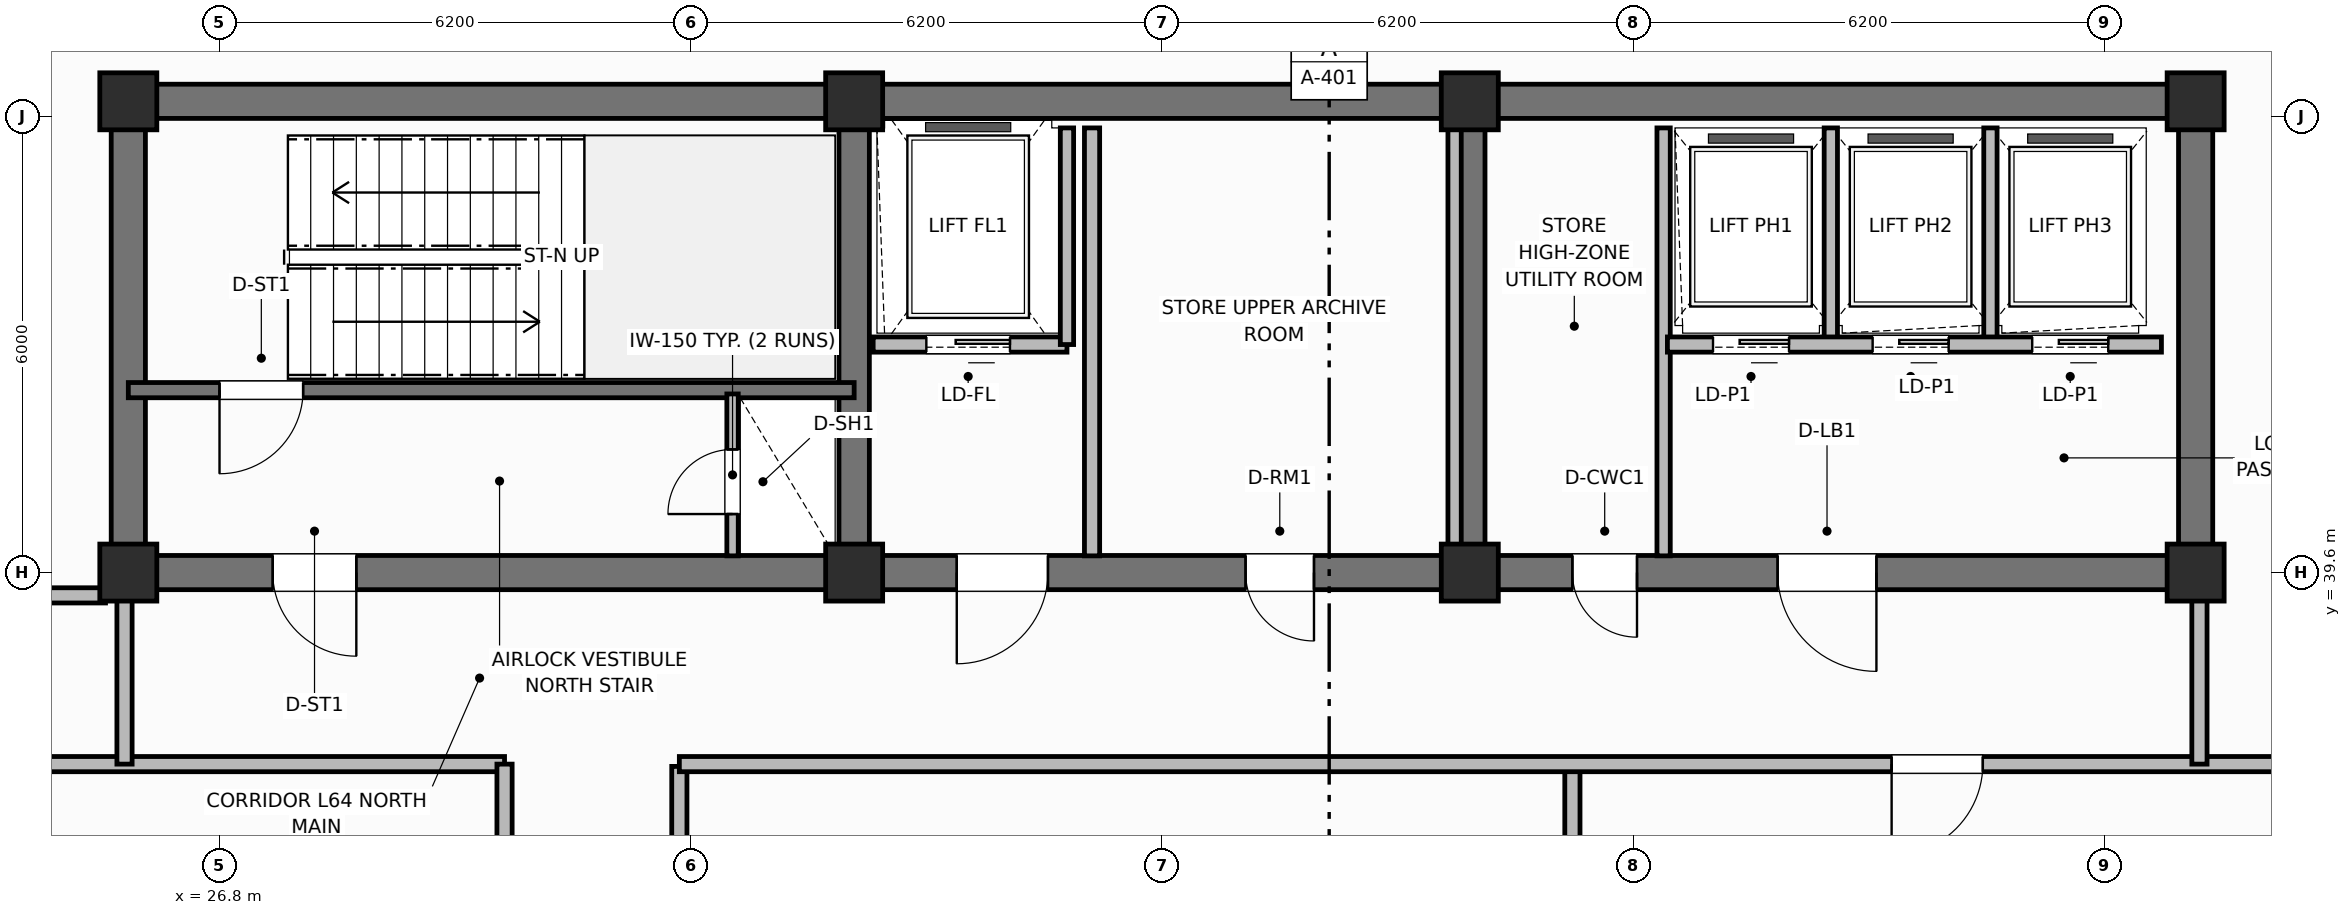
"""IFC4 building model, lengths in metres.
Left out: names, types, materials, properties, quantities, classifications, styles, units other than length and angle.
Written with IfcOpenShell. Run it as: python <this file> out.ifc"""

import sys

from ifc_helpers import new_model, si_unit, direction, frame, frame_2d, origin, origin_2d, place, context, subcontext, project, spatial, rectangle, extrude, element, fill, save


model = new_model("IFC4")
c1 = context("Model", 3, precision=1e-05, world=origin(), true_north=direction((0.0, 1.0)))
c2 = subcontext(c1, "Body", "Model", "MODEL_VIEW")
j1 = project(units=[si_unit("LENGTHUNIT", "METRE"), si_unit("PLANEANGLEUNIT", "RADIAN")], contexts=[c1])
p1 = place(None, origin())
s1 = spatial("IfcSite", under=j1, at=p1, CompositionType="ELEMENT")
p2 = place(p1, origin())
s2 = spatial("IfcBuilding", under=s1, at=p2, CompositionType="ELEMENT")
p3 = place(p2, frame((0.0, 0.0, 255.4)))
s3 = spatial("IfcBuildingStorey", under=s2, at=p3, CompositionType="ELEMENT", Elevation=255.4)
p4 = place(p3, frame((25.6, 45.8, 0.0), z_axis=(0.0, 0.0, 1.0), x_axis=(1.0, 0.0, 0.0)))
e1 = element("IfcWall", 1, at=p4, inside=s3, PredefinedType="SHEAR", context=c2, shape_type="SweptSolid", body=[
    extrude(rectangle(XDim=27.2, YDim=0.45, at=frame_2d((13.6, 0.0))), origin(), (0.0, 0.0, 1.0), 4.8),
])
for number, where, z_axis, x_axis in (
    (2, (25.6, 39.825, 0.0), (0.0, 0.0, 1.0), (0.0, 1.0, 0.0)),
    (3, (52.8, 39.825, 0.0), (0.0, 0.0, 1.0), (0.0, 1.0, 0.0)),
):
    element("IfcWall", number, at=place(p3, frame(where, z_axis=z_axis, x_axis=x_axis)), inside=s3, PredefinedType="SHEAR", context=c2, shape_type="SweptSolid", body=[
        extrude(rectangle(XDim=5.75, YDim=0.45, at=frame_2d((2.875, 0.0))), origin(), (0.0, 0.0, 1.0), 4.8),
    ])
p5 = place(p3, frame((52.8, 39.6, 0.0), z_axis=(0.0, 0.0, 1.0), x_axis=(-1.0, 0.0, 0.0)))
e4 = element("IfcWall", 4, at=p5, inside=s3, PredefinedType="SHEAR", context=c2, shape_type="SweptSolid", body=[
    extrude(rectangle(XDim=27.2, YDim=0.45, at=frame_2d((13.6, 0.0))), origin(), (0.0, 0.0, 1.0), 4.8),
])
p6 = place(p5, frame((24.2, 0.0, 0.0)))
e5 = element("IfcOpeningElement", 5, at=p6, cuts=e4, PredefinedType="OPENING", context=c2, shape_type="SweptSolid", body=[
    extrude(rectangle(XDim=1.1, YDim=2.15, at=frame_2d((0.55, 1.075))), frame((0.0, 0.235, 0.0), z_axis=(0.0, -1.0, 0.0), x_axis=(1.0, 0.0, 0.0)), (0.0, 0.0, 1.0), 0.47),
])
p7 = place(p5, frame((15.1, 0.0, 0.0)))
e6 = element("IfcOpeningElement", 6, at=p7, cuts=e4, PredefinedType="OPENING", context=c2, shape_type="SweptSolid", body=[
    extrude(rectangle(XDim=1.2, YDim=2.15, at=frame_2d((0.6, 1.075))), frame((0.0, 0.235, 0.0), z_axis=(0.0, -1.0, 0.0), x_axis=(1.0, 0.0, 0.0)), (0.0, 0.0, 1.0), 0.47),
])
p8 = place(p5, frame((11.6, 0.0, 0.0)))
e7 = element("IfcOpeningElement", 7, at=p8, cuts=e4, PredefinedType="OPENING", context=c2, shape_type="SweptSolid", body=[
    extrude(rectangle(XDim=0.9, YDim=2.1, at=frame_2d((0.45, 1.05))), frame((0.0, 0.235, 0.0), z_axis=(0.0, -1.0, 0.0), x_axis=(1.0, 0.0, 0.0)), (0.0, 0.0, 1.0), 0.47),
])
p9 = place(p5, frame((7.35, 0.0, 0.0)))
e8 = element("IfcOpeningElement", 8, at=p9, cuts=e4, PredefinedType="OPENING", context=c2, shape_type="SweptSolid", body=[
    extrude(rectangle(XDim=0.85, YDim=2.1, at=frame_2d((0.425, 1.05))), frame((0.0, 0.235, 0.0), z_axis=(0.0, -1.0, 0.0), x_axis=(1.0, 0.0, 0.0)), (0.0, 0.0, 1.0), 0.47),
])
p10 = place(p5, frame((4.2, 0.0, 0.0)))
e9 = element("IfcOpeningElement", 9, at=p10, cuts=e4, PredefinedType="OPENING", context=c2, shape_type="SweptSolid", body=[
    extrude(rectangle(XDim=1.3, YDim=2.2, at=frame_2d((0.65, 1.1))), frame((0.0, 0.235, 0.0), z_axis=(0.0, -1.0, 0.0), x_axis=(1.0, 0.0, 0.0)), (0.0, 0.0, 1.0), 0.47),
])
for number, where, z_axis, x_axis in (
    (10, (35.15, 39.825, 0.0), (0.0, 0.0, 1.0), (0.0, 1.0, 0.0)),
    (11, (43.25, 39.825, 0.0), (0.0, 0.0, 1.0), (0.0, 1.0, 0.0)),
):
    element("IfcWall", number, at=place(p3, frame(where, z_axis=z_axis, x_axis=x_axis)), inside=s3, PredefinedType="SHEAR", context=c2, shape_type="SweptSolid", body=[
        extrude(rectangle(XDim=5.75, YDim=0.4, at=frame_2d((2.875, 0.0))), origin(), (0.0, 0.0, 1.0), 4.8),
    ])
for number, where, z_axis, x_axis in (
    (12, (25.6, 39.6, 0.0), (0.0, 0.0, 1.0), (1.0, 0.0, 0.0)),
    (13, (25.6, 45.8, 0.0), (0.0, 0.0, 1.0), (1.0, 0.0, 0.0)),
    (14, (35.15, 39.6, 0.0), (0.0, 0.0, 1.0), (1.0, 0.0, 0.0)),
    (15, (35.15, 45.8, 0.0), (0.0, 0.0, 1.0), (1.0, 0.0, 0.0)),
    (16, (43.25, 39.6, 0.0), (0.0, 0.0, 1.0), (1.0, 0.0, 0.0)),
    (17, (43.25, 45.8, 0.0), (0.0, 0.0, 1.0), (1.0, 0.0, 0.0)),
    (18, (52.8, 39.6, 0.0), (0.0, 0.0, 1.0), (1.0, 0.0, 0.0)),
    (19, (52.8, 45.8, 0.0), (0.0, 0.0, 1.0), (1.0, 0.0, 0.0)),
):
    element("IfcColumn", number, at=place(p3, frame(where, z_axis=z_axis, x_axis=x_axis)), inside=s3, PredefinedType="COLUMN", context=c2, shape_type="SweptSolid", body=[
        extrude(rectangle(XDim=0.75, YDim=0.75, at=origin_2d()), origin(), (0.0, 0.0, 1.0), 4.8),
    ])
p11 = place(p3, frame((35.15, 42.0, 0.0), z_axis=(0.0, 0.0, 1.0), x_axis=(-1.0, 0.0, 0.0)))
e20 = element("IfcWall", 20, at=p11, inside=s3, PredefinedType="SHEAR", context=c2, shape_type="SweptSolid", body=[
    extrude(rectangle(XDim=9.55, YDim=0.2, at=frame_2d((4.775, 0.0))), origin(), (0.0, 0.0, 1.0), 4.8),
])
p12 = place(p11, frame((7.25, 0.0, 0.0)))
e21 = element("IfcOpeningElement", 21, at=p12, cuts=e20, PredefinedType="OPENING", context=c2, shape_type="SweptSolid", body=[
    extrude(rectangle(XDim=1.1, YDim=2.15, at=frame_2d((0.55, 1.075))), frame((0.0, 0.11, 0.0), z_axis=(0.0, -1.0, 0.0), x_axis=(1.0, 0.0, 0.0)), (0.0, 0.0, 1.0), 0.22),
])
p13 = place(p3, frame((33.55, 39.82, 0.0), z_axis=(0.0, 0.0, 1.0), x_axis=(0.0, 1.0, 0.0)))
e22 = element("IfcWall", 22, at=p13, inside=s3, PredefinedType="PARTITIONING", context=c2, shape_type="SweptSolid", body=[
    extrude(rectangle(XDim=2.13, YDim=0.15, at=frame_2d((1.065, 0.0))), origin(), (0.0, 0.0, 1.0), 3.66),
])
p14 = place(p13, frame((0.55, 0.0, 0.0)))
e23 = element("IfcOpeningElement", 23, at=p14, cuts=e22, PredefinedType="OPENING", context=c2, shape_type="SweptSolid", body=[
    extrude(rectangle(XDim=0.85, YDim=2.05, at=frame_2d((0.425, 1.025))), frame((0.0, 0.085, 0.0), z_axis=(0.0, -1.0, 0.0), x_axis=(1.0, 0.0, 0.0)), (0.0, 0.0, 1.0), 0.17),
])
p15 = place(p3, frame((37.95, 42.6, 0.0), z_axis=(0.0, 0.0, 1.0), x_axis=(-1.0, 0.0, 0.0)))
e24 = element("IfcWall", 24, at=p15, inside=s3, PredefinedType="PARTITIONING", context=c2, shape_type="SweptSolid", body=[
    extrude(rectangle(XDim=2.55, YDim=0.2, at=frame_2d((1.275, 0.0))), origin(), (0.0, 0.0, 1.0), 3.43),
])
p16 = place(p15, frame((0.75, 0.0, 0.0)))
e25 = element("IfcOpeningElement", 25, at=p16, cuts=e24, PredefinedType="OPENING", context=c2, shape_type="SweptSolid", body=[
    extrude(rectangle(XDim=1.1, YDim=2.15, at=frame_2d((0.55, 1.075))), frame((0.0, 0.11, 0.0), z_axis=(0.0, -1.0, 0.0), x_axis=(1.0, 0.0, 0.0)), (0.0, 0.0, 1.0), 0.22),
])
p17 = place(p3, frame((37.95, 42.6, 0.0), z_axis=(0.0, 0.0, 1.0), x_axis=(0.0, 1.0, 0.0)))
e26 = element("IfcWall", 26, at=p17, inside=s3, PredefinedType="PARTITIONING", context=c2, shape_type="SweptSolid", body=[
    extrude(rectangle(XDim=2.85, YDim=0.175, at=frame_2d((1.425, 0.0))), origin(), (0.0, 0.0, 1.0), 3.66),
])
p18 = place(p3, frame((38.28, 39.82, 0.0), z_axis=(0.0, 0.0, 1.0), x_axis=(0.0, 1.0, 0.0)))
e27 = element("IfcWall", 27, at=p18, inside=s3, PredefinedType="PARTITIONING", context=c2, shape_type="SweptSolid", body=[
    extrude(rectangle(XDim=5.63, YDim=0.2, at=frame_2d((2.815, 0.0))), origin(), (0.0, 0.0, 1.0), 3.66),
])
for number, where, z_axis, x_axis in (
    (28, (43.05, 39.82, 0.0), (0.0, 0.0, 1.0), (0.0, 1.0, 0.0)),
    (29, (45.8, 39.82, 0.0), (0.0, 0.0, 1.0), (0.0, 1.0, 0.0)),
):
    element("IfcWall", number, at=place(p3, frame(where, z_axis=z_axis, x_axis=x_axis)), inside=s3, PredefinedType="PARTITIONING", context=c2, shape_type="SweptSolid", body=[
        extrude(rectangle(XDim=5.63, YDim=0.175, at=frame_2d((2.815, 0.0))), origin(), (0.0, 0.0, 1.0), 3.66),
    ])
for number, where, z_axis, x_axis in (
    (30, (48.0, 42.65, 0.0), (0.0, 0.0, 1.0), (0.0, 1.0, 0.0)),
    (31, (50.1, 42.65, 0.0), (0.0, 0.0, 1.0), (0.0, 1.0, 0.0)),
):
    element("IfcWall", number, at=place(p3, frame(where, z_axis=z_axis, x_axis=x_axis)), inside=s3, PredefinedType="PARTITIONING", context=c2, shape_type="SweptSolid", body=[
        extrude(rectangle(XDim=2.8, YDim=0.175, at=frame_2d((1.4, 0.0))), origin(), (0.0, 0.0, 1.0), 3.66),
    ])
p19 = place(p3, frame((52.35, 42.6, 0.0), z_axis=(0.0, 0.0, 1.0), x_axis=(-1.0, 0.0, 0.0)))
e32 = element("IfcWall", 32, at=p19, inside=s3, PredefinedType="PARTITIONING", context=c2, shape_type="SweptSolid", body=[
    extrude(rectangle(XDim=6.5, YDim=0.2, at=frame_2d((3.25, 0.0))), origin(), (0.0, 0.0, 1.0), 3.66),
])
p20 = place(p19, frame((4.9, 0.0, 0.0)))
e33 = element("IfcOpeningElement", 33, at=p20, cuts=e32, PredefinedType="OPENING", context=c2, shape_type="SweptSolid", body=[
    extrude(rectangle(XDim=1.0, YDim=2.15, at=frame_2d((0.5, 1.075))), frame((0.0, 0.11, 0.0), z_axis=(0.0, -1.0, 0.0), x_axis=(1.0, 0.0, 0.0)), (0.0, 0.0, 1.0), 0.22),
])
p21 = place(p19, frame((2.8, 0.0, 0.0)))
e34 = element("IfcOpeningElement", 34, at=p21, cuts=e32, PredefinedType="OPENING", context=c2, shape_type="SweptSolid", body=[
    extrude(rectangle(XDim=1.0, YDim=2.15, at=frame_2d((0.5, 1.075))), frame((0.0, 0.11, 0.0), z_axis=(0.0, -1.0, 0.0), x_axis=(1.0, 0.0, 0.0)), (0.0, 0.0, 1.0), 0.22),
])
p22 = place(p19, frame((0.7, 0.0, 0.0)))
e35 = element("IfcOpeningElement", 35, at=p22, cuts=e32, PredefinedType="OPENING", context=c2, shape_type="SweptSolid", body=[
    extrude(rectangle(XDim=1.0, YDim=2.15, at=frame_2d((0.5, 1.075))), frame((0.0, 0.11, 0.0), z_axis=(0.0, -1.0, 0.0), x_axis=(1.0, 0.0, 0.0)), (0.0, 0.0, 1.0), 0.22),
])
p23 = place(p3, frame((19.53, 37.08, 0.0), z_axis=(0.0, 0.0, 1.0), x_axis=(1.0, 0.0, 0.0)))
e36 = element("IfcWall", 36, at=p23, inside=s3, PredefinedType="PARTITIONING", context=c2, shape_type="SweptSolid", body=[
    extrude(rectangle(XDim=11.02, YDim=0.2, at=frame_2d((5.51, 0.0))), origin(), (0.0, 0.0, 1.0), 3.66),
])
p24 = place(p3, frame((30.55, 19.32, 0.0), z_axis=(0.0, 0.0, 1.0), x_axis=(0.0, 1.0, 0.0)))
e37 = element("IfcWall", 37, at=p24, inside=s3, PredefinedType="PARTITIONING", context=c2, shape_type="SweptSolid", body=[
    extrude(rectangle(XDim=17.76, YDim=0.2, at=frame_2d((8.88, 0.0))), origin(), (0.0, 0.0, 1.0), 3.66),
])
p25 = place(p24, frame((6.0, 0.0, 0.0)))
e38 = element("IfcOpeningElement", 38, at=p25, cuts=e37, PredefinedType="OPENING", context=c2, shape_type="SweptSolid", body=[
    extrude(rectangle(XDim=1.2, YDim=2.15, at=frame_2d((0.6, 1.075))), frame((0.0, 0.11, 0.0), z_axis=(0.0, -1.0, 0.0), x_axis=(1.0, 0.0, 0.0)), (0.0, 0.0, 1.0), 0.22),
])
p26 = place(p3, frame((32.85, 19.35, 0.0), z_axis=(0.0, 0.0, 1.0), x_axis=(0.0, 1.0, 0.0)))
e39 = element("IfcWall", 39, at=p26, inside=s3, PredefinedType="PARTITIONING", context=c2, shape_type="SweptSolid", body=[
    extrude(rectangle(XDim=17.7, YDim=0.2, at=frame_2d((8.85, 0.0))), origin(), (0.0, 0.0, 1.0), 3.66),
])
p27 = place(p26, frame((6.0, 0.0, 0.0)))
e40 = element("IfcOpeningElement", 40, at=p27, cuts=e39, PredefinedType="OPENING", context=c2, shape_type="SweptSolid", body=[
    extrude(rectangle(XDim=1.2, YDim=2.15, at=frame_2d((0.6, 1.075))), frame((0.0, 0.11, 0.0), z_axis=(0.0, -1.0, 0.0), x_axis=(1.0, 0.0, 0.0)), (0.0, 0.0, 1.0), 0.22),
])
p28 = place(p3, frame((44.6, 19.35, 0.0), z_axis=(0.0, 0.0, 1.0), x_axis=(0.0, 1.0, 0.0)))
e41 = element("IfcWall", 41, at=p28, inside=s3, PredefinedType="PARTITIONING", context=c2, shape_type="SweptSolid", body=[
    extrude(rectangle(XDim=17.7, YDim=0.2, at=frame_2d((8.85, 0.0))), origin(), (0.0, 0.0, 1.0), 3.66),
])
p29 = place(p3, frame((58.87, 37.08, 0.0), z_axis=(0.0, 0.0, 1.0), x_axis=(-1.0, 0.0, 0.0)))
e42 = element("IfcWall", 42, at=p29, inside=s3, PredefinedType="PARTITIONING", context=c2, shape_type="SweptSolid", body=[
    extrude(rectangle(XDim=26.02, YDim=0.2, at=frame_2d((13.01, 0.0))), origin(), (0.0, 0.0, 1.0), 3.66),
])
p30 = place(p29, frame((8.87, 0.0, 0.0)))
e43 = element("IfcOpeningElement", 43, at=p30, cuts=e42, PredefinedType="OPENING", context=c2, shape_type="SweptSolid", body=[
    extrude(rectangle(XDim=1.2, YDim=2.15, at=frame_2d((0.6, 1.075))), frame((0.0, 0.11, 0.0), z_axis=(0.0, -1.0, 0.0), x_axis=(1.0, 0.0, 0.0)), (0.0, 0.0, 1.0), 0.22),
])
for number, where, z_axis, x_axis in (
    (44, (52.85, 37.08, 0.0), (0.0, 0.0, 1.0), (0.0, 1.0, 0.0)),
    (45, (25.55, 37.08, 0.0), (0.0, 0.0, 1.0), (0.0, 1.0, 0.0)),
):
    element("IfcWall", number, at=place(p3, frame(where, z_axis=z_axis, x_axis=x_axis)), inside=s3, PredefinedType="PARTITIONING", context=c2, shape_type="SweptSolid", body=[
        extrude(rectangle(XDim=2.37, YDim=0.2, at=frame_2d((1.185, 0.0))), origin(), (0.0, 0.0, 1.0), 3.66),
    ])
p31 = place(p3, frame((19.53, 39.3, 0.0), z_axis=(0.0, 0.0, 1.0), x_axis=(1.0, 0.0, 0.0)))
e46 = element("IfcWall", 46, at=p31, inside=s3, PredefinedType="PARTITIONING", context=c2, shape_type="SweptSolid", body=[
    extrude(rectangle(XDim=5.77, YDim=0.2, at=frame_2d((2.885, 0.0))), origin(), (0.0, 0.0, 1.0), 3.66),
])
p32 = place(p12, origin())
e47 = element("IfcDoor", 47, at=p32, inside=s3, OperationType="SINGLE_SWING_RIGHT", PredefinedType="DOOR", context=c2, shape_type="SweptSolid", body=[
    extrude(rectangle(XDim=1.1, YDim=2.15, at=frame_2d((0.55, 1.075))), frame((0.0, 0.025, 0.0), z_axis=(0.0, -1.0, 0.0), x_axis=(1.0, 0.0, 0.0)), (0.0, 0.0, 1.0), 0.05),
])
fill(e21, e47)
p33 = place(p14, origin())
e48 = element("IfcDoor", 48, at=p33, inside=s3, OperationType="SINGLE_SWING_LEFT", PredefinedType="TRAPDOOR", context=c2, shape_type="SweptSolid", body=[
    extrude(rectangle(XDim=0.85, YDim=2.05, at=frame_2d((0.425, 1.025))), frame((0.0, 0.025, 0.0), z_axis=(0.0, -1.0, 0.0), x_axis=(1.0, 0.0, 0.0)), (0.0, 0.0, 1.0), 0.05),
])
fill(e23, e48)
p34 = place(p16, origin())
e49 = element("IfcDoor", 49, at=p34, inside=s3, OperationType="SLIDING_TO_LEFT", PredefinedType="DOOR", context=c2, shape_type="SweptSolid", body=[
    extrude(rectangle(XDim=1.1, YDim=2.15, at=frame_2d((0.55, 1.075))), frame((0.0, 0.025, 0.0), z_axis=(0.0, -1.0, 0.0), x_axis=(1.0, 0.0, 0.0)), (0.0, 0.0, 1.0), 0.05),
])
fill(e25, e49)
p35 = place(p20, origin())
e50 = element("IfcDoor", 50, at=p35, inside=s3, OperationType="SLIDING_TO_LEFT", PredefinedType="DOOR", context=c2, shape_type="SweptSolid", body=[
    extrude(rectangle(XDim=1.0, YDim=2.15, at=frame_2d((0.5, 1.075))), frame((0.0, 0.025, 0.0), z_axis=(0.0, -1.0, 0.0), x_axis=(1.0, 0.0, 0.0)), (0.0, 0.0, 1.0), 0.05),
])
fill(e33, e50)
p36 = place(p21, origin())
e51 = element("IfcDoor", 51, at=p36, inside=s3, OperationType="SLIDING_TO_LEFT", PredefinedType="DOOR", context=c2, shape_type="SweptSolid", body=[
    extrude(rectangle(XDim=1.0, YDim=2.15, at=frame_2d((0.5, 1.075))), frame((0.0, 0.025, 0.0), z_axis=(0.0, -1.0, 0.0), x_axis=(1.0, 0.0, 0.0)), (0.0, 0.0, 1.0), 0.05),
])
fill(e34, e51)
p37 = place(p22, origin())
e52 = element("IfcDoor", 52, at=p37, inside=s3, OperationType="SLIDING_TO_LEFT", PredefinedType="DOOR", context=c2, shape_type="SweptSolid", body=[
    extrude(rectangle(XDim=1.0, YDim=2.15, at=frame_2d((0.5, 1.075))), frame((0.0, 0.025, 0.0), z_axis=(0.0, -1.0, 0.0), x_axis=(1.0, 0.0, 0.0)), (0.0, 0.0, 1.0), 0.05),
])
fill(e35, e52)
p38 = place(p30, origin())
e53 = element("IfcDoor", 53, at=p38, inside=s3, OperationType="SINGLE_SWING_RIGHT", PredefinedType="DOOR", context=c2, shape_type="SweptSolid", body=[
    extrude(rectangle(XDim=1.2, YDim=2.15, at=frame_2d((0.6, 1.075))), frame((0.0, 0.025, 0.0), z_axis=(0.0, -1.0, 0.0), x_axis=(1.0, 0.0, 0.0)), (0.0, 0.0, 1.0), 0.05),
])
fill(e43, e53)
p39 = place(p6, origin())
e54 = element("IfcDoor", 54, at=p39, inside=s3, OperationType="SINGLE_SWING_LEFT", PredefinedType="DOOR", context=c2, shape_type="SweptSolid", body=[
    extrude(rectangle(XDim=1.1, YDim=2.15, at=frame_2d((0.55, 1.075))), frame((0.0, 0.025, 0.0), z_axis=(0.0, -1.0, 0.0), x_axis=(1.0, 0.0, 0.0)), (0.0, 0.0, 1.0), 0.05),
])
fill(e5, e54)
p40 = place(p7, origin())
e55 = element("IfcDoor", 55, at=p40, inside=s3, OperationType="SINGLE_SWING_RIGHT", PredefinedType="DOOR", context=c2, shape_type="SweptSolid", body=[
    extrude(rectangle(XDim=1.2, YDim=2.15, at=frame_2d((0.6, 1.075))), frame((0.0, 0.025, 0.0), z_axis=(0.0, -1.0, 0.0), x_axis=(1.0, 0.0, 0.0)), (0.0, 0.0, 1.0), 0.05),
])
fill(e6, e55)
p41 = place(p8, origin())
e56 = element("IfcDoor", 56, at=p41, inside=s3, OperationType="SINGLE_SWING_LEFT", PredefinedType="DOOR", context=c2, shape_type="SweptSolid", body=[
    extrude(rectangle(XDim=0.9, YDim=2.1, at=frame_2d((0.45, 1.05))), frame((0.0, 0.025, 0.0), z_axis=(0.0, -1.0, 0.0), x_axis=(1.0, 0.0, 0.0)), (0.0, 0.0, 1.0), 0.05),
])
fill(e7, e56)
p42 = place(p9, origin())
e57 = element("IfcDoor", 57, at=p42, inside=s3, OperationType="SINGLE_SWING_LEFT", PredefinedType="DOOR", context=c2, shape_type="SweptSolid", body=[
    extrude(rectangle(XDim=0.85, YDim=2.1, at=frame_2d((0.425, 1.05))), frame((0.0, 0.025, 0.0), z_axis=(0.0, -1.0, 0.0), x_axis=(1.0, 0.0, 0.0)), (0.0, 0.0, 1.0), 0.05),
])
fill(e8, e57)
p43 = place(p10, origin())
e58 = element("IfcDoor", 58, at=p43, inside=s3, OperationType="SINGLE_SWING_LEFT", PredefinedType="DOOR", context=c2, shape_type="SweptSolid", body=[
    extrude(rectangle(XDim=1.3, YDim=2.2, at=frame_2d((0.65, 1.1))), frame((0.0, 0.025, 0.0), z_axis=(0.0, -1.0, 0.0), x_axis=(1.0, 0.0, 0.0)), (0.0, 0.0, 1.0), 0.05),
])
fill(e9, e58)
save(model, sys.argv[1])
